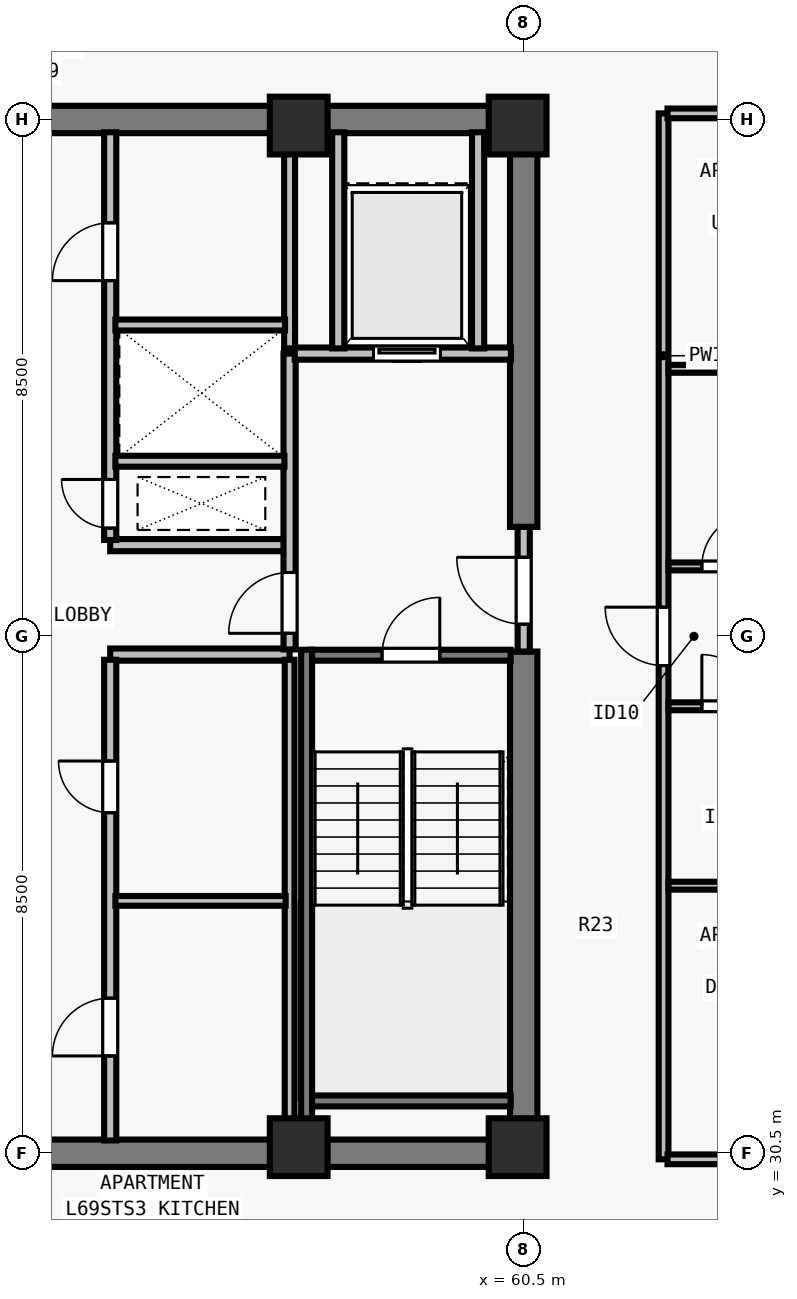
"""IFC4 building model, lengths in metres.
Left out: names, types, materials, properties, quantities, classifications, styles, units other than length and angle.
Written with IfcOpenShell. Run it as: python <this file> out.ifc"""

import sys

from ifc_helpers import new_model, si_unit, direction, frame, frame_2d, origin, origin_2d, place, context, subcontext, project, spatial, rectangle, extrude, element, fill, save


model = new_model("IFC4")
c1 = context("Model", 3, precision=1e-05, world=origin(), true_north=direction((0.0, 1.0)))
c2 = subcontext(c1, "Body", "Model", "MODEL_VIEW")
j1 = project(units=[si_unit("LENGTHUNIT", "METRE"), si_unit("PLANEANGLEUNIT", "RADIAN")], contexts=[c1])
p1 = place(None, origin())
s1 = spatial("IfcSite", under=j1, at=p1, CompositionType="ELEMENT")
p2 = place(p1, origin())
s2 = spatial("IfcBuilding", under=s1, at=p2, CompositionType="ELEMENT")
p3 = place(p2, frame((0.0, 0.0, 251.5)))
s3 = spatial("IfcBuildingStorey", under=s2, at=p3, CompositionType="ELEMENT", Elevation=251.5)
for number, where, z_axis, x_axis in (
    (1, (56.8, 30.6, 0.0), (0.0, 0.0, 1.0), (1.0, 0.0, 0.0)),
    (2, (60.4, 30.6, 0.0), (0.0, 0.0, 1.0), (1.0, 0.0, 0.0)),
    (3, (56.8, 47.4, 0.0), (0.0, 0.0, 1.0), (1.0, 0.0, 0.0)),
    (4, (60.4, 47.4, 0.0), (0.0, 0.0, 1.0), (1.0, 0.0, 0.0)),
):
    element("IfcColumn", number, at=place(p3, frame(where, z_axis=z_axis, x_axis=x_axis)), inside=s3, PredefinedType="COLUMN", context=c2, shape_type="SweptSolid", body=[
        extrude(rectangle(XDim=0.95, YDim=0.95, at=origin_2d()), origin(), (0.0, 0.0, 1.0), 3.5),
    ])
for number, where, z_axis, x_axis in (
    (5, (43.275, 30.5, 0.0), (0.0, 0.0, 1.0), (1.0, 0.0, 0.0)),
    (6, (43.275, 47.5, 0.0), (0.0, 0.0, 1.0), (1.0, 0.0, 0.0)),
):
    element("IfcWall", number, at=place(p3, frame(where, z_axis=z_axis, x_axis=x_axis)), inside=s3, PredefinedType="SHEAR", context=c2, shape_type="SweptSolid", body=[
        extrude(rectangle(XDim=17.45, YDim=0.45, at=frame_2d((8.725, 0.0))), origin(), (0.0, 0.0, 1.0), 3.29),
    ])
p4 = place(p3, frame((60.5, 30.715, 0.0), z_axis=(0.0, 0.0, 1.0), x_axis=(0.0, 1.0, 0.0)))
e7 = element("IfcWall", 7, at=p4, inside=s3, PredefinedType="SHEAR", context=c2, shape_type="SweptSolid", body=[
    extrude(rectangle(XDim=8.035, YDim=0.45, at=frame_2d((4.018, 0.0))), origin(), (0.0, 0.0, 1.0), 3.29),
])
p5 = place(p3, frame((60.5, 40.8, 0.0), z_axis=(0.0, 0.0, 1.0), x_axis=(0.0, 1.0, 0.0)))
e8 = element("IfcWall", 8, at=p5, inside=s3, PredefinedType="SHEAR", context=c2, shape_type="SweptSolid", body=[
    extrude(rectangle(XDim=6.485, YDim=0.45, at=frame_2d((3.242, 0.0))), origin(), (0.0, 0.0, 1.0), 3.29),
])
for number, where, z_axis, x_axis in (
    (9, (53.7, 38.7, 0.0), (0.0, 0.0, 1.0), (1.0, 0.0, 0.0)),
    (10, (53.7, 40.5, 0.0), (0.0, 0.0, 1.0), (1.0, 0.0, 0.0)),
):
    element("IfcWall", number, at=place(p3, frame(where, z_axis=z_axis, x_axis=x_axis)), inside=s3, PredefinedType="SOLIDWALL", context=c2, shape_type="SweptSolid", body=[
        extrude(rectangle(XDim=2.95, YDim=0.2, at=frame_2d((1.475, 0.0))), origin(), (0.0, 0.0, 1.0), 3.29),
    ])
p6 = place(p3, frame((53.7, 30.71, 0.0), z_axis=(0.0, 0.0, 1.0), x_axis=(0.0, 1.0, 0.0)))
e11 = element("IfcWall", 11, at=p6, inside=s3, PredefinedType="SOLIDWALL", context=c2, shape_type="SweptSolid", body=[
    extrude(rectangle(XDim=7.905, YDim=0.2, at=frame_2d((3.953, 0.0))), origin(), (0.0, 0.0, 1.0), 3.29),
])
p7 = place(p6, frame((1.39, 0.0, 0.0)))
e12 = element("IfcOpeningElement", 12, at=p7, cuts=e11, PredefinedType="OPENING", context=c2, shape_type="SweptSolid", body=[
    extrude(rectangle(XDim=0.95, YDim=2.12, at=frame_2d((0.475, 1.06))), frame((0.0, 0.11, 0.0), z_axis=(0.0, -1.0, 0.0), x_axis=(1.0, 0.0, 0.0)), (0.0, 0.0, 1.0), 0.22),
])
p8 = place(p6, frame((5.39, 0.0, 0.0)))
e13 = element("IfcOpeningElement", 13, at=p8, cuts=e11, PredefinedType="OPENING", context=c2, shape_type="SweptSolid", body=[
    extrude(rectangle(XDim=0.85, YDim=2.12, at=frame_2d((0.425, 1.06))), frame((0.0, 0.11, 0.0), z_axis=(0.0, -1.0, 0.0), x_axis=(1.0, 0.0, 0.0)), (0.0, 0.0, 1.0), 0.22),
])
p9 = place(p3, frame((53.7, 40.585, 0.0), z_axis=(0.0, 0.0, 1.0), x_axis=(0.0, 1.0, 0.0)))
e14 = element("IfcWall", 14, at=p9, inside=s3, PredefinedType="SOLIDWALL", context=c2, shape_type="SweptSolid", body=[
    extrude(rectangle(XDim=6.705, YDim=0.2, at=frame_2d((3.353, 0.0))), origin(), (0.0, 0.0, 1.0), 3.29),
])
p10 = place(p9, frame((0.195, 0.0, 0.0)))
e15 = element("IfcOpeningElement", 15, at=p10, cuts=e14, PredefinedType="OPENING", context=c2, shape_type="SweptSolid", body=[
    extrude(rectangle(XDim=0.8, YDim=2.08, at=frame_2d((0.4, 1.04))), frame((0.0, 0.11, 0.0), z_axis=(0.0, -1.0, 0.0), x_axis=(1.0, 0.0, 0.0)), (0.0, 0.0, 1.0), 0.22),
])
p11 = place(p9, frame((4.265, 0.0, 0.0)))
e16 = element("IfcOpeningElement", 16, at=p11, cuts=e14, PredefinedType="OPENING", context=c2, shape_type="SweptSolid", body=[
    extrude(rectangle(XDim=0.95, YDim=2.12, at=frame_2d((0.475, 1.06))), frame((0.0, 0.11, 0.0), z_axis=(0.0, -1.0, 0.0), x_axis=(1.0, 0.0, 0.0)), (0.0, 0.0, 1.0), 0.22),
])
p12 = place(p3, frame((60.5, 38.75, 0.0), z_axis=(0.0, 0.0, 1.0), x_axis=(0.0, 1.0, 0.0)))
e17 = element("IfcWall", 17, at=p12, inside=s3, PredefinedType="SOLIDWALL", context=c2, shape_type="SweptSolid", body=[
    extrude(rectangle(XDim=2.05, YDim=0.2, at=frame_2d((1.025, 0.0))), origin(), (0.0, 0.0, 1.0), 3.29),
])
p13 = place(p12, frame((0.45, 0.0, 0.0)))
e18 = element("IfcOpeningElement", 18, at=p13, cuts=e17, PredefinedType="OPENING", context=c2, shape_type="SweptSolid", body=[
    extrude(rectangle(XDim=1.1, YDim=2.15, at=frame_2d((0.55, 1.075))), frame((0.0, 0.11, 0.0), z_axis=(0.0, -1.0, 0.0), x_axis=(1.0, 0.0, 0.0)), (0.0, 0.0, 1.0), 0.22),
])
p14 = place(p3, frame((56.65, 38.785, 0.0), z_axis=(0.0, 0.0, 1.0), x_axis=(0.0, 1.0, 0.0)))
e19 = element("IfcWall", 19, at=p14, inside=s3, PredefinedType="SOLIDWALL", context=c2, shape_type="SweptSolid", body=[
    extrude(rectangle(XDim=4.865, YDim=0.2, at=frame_2d((2.433, 0.0))), origin(), (0.0, 0.0, 1.0), 3.29),
])
p15 = place(p14, frame((0.265, 0.0, 0.0)))
e20 = element("IfcOpeningElement", 20, at=p15, cuts=e19, PredefinedType="OPENING", context=c2, shape_type="SweptSolid", body=[
    extrude(rectangle(XDim=1.0, YDim=2.15, at=frame_2d((0.5, 1.075))), frame((0.0, 0.11, 0.0), z_axis=(0.0, -1.0, 0.0), x_axis=(1.0, 0.0, 0.0)), (0.0, 0.0, 1.0), 0.22),
])
p16 = place(p3, frame((56.735, 43.65, 0.0), z_axis=(0.0, 0.0, 1.0), x_axis=(1.0, 0.0, 0.0)))
e21 = element("IfcWall", 21, at=p16, inside=s3, PredefinedType="SOLIDWALL", context=c2, shape_type="SweptSolid", body=[
    extrude(rectangle(XDim=3.555, YDim=0.2, at=frame_2d((1.777, 0.0))), origin(), (0.0, 0.0, 1.0), 3.29),
])
p17 = place(p16, frame((1.295, 0.0, 0.0)))
e22 = element("IfcOpeningElement", 22, at=p17, cuts=e21, PredefinedType="OPENING", context=c2, shape_type="SweptSolid", body=[
    extrude(rectangle(XDim=1.1, YDim=2.2, at=frame_2d((0.55, 1.1))), frame((0.0, 0.11, 0.0), z_axis=(0.0, -1.0, 0.0), x_axis=(1.0, 0.0, 0.0)), (0.0, 0.0, 1.0), 0.22),
])
for number, where, z_axis, x_axis in (
    (23, (57.45, 43.735, 0.0), (0.0, 0.0, 1.0), (0.0, 1.0, 0.0)),
    (24, (59.75, 43.735, 0.0), (0.0, 0.0, 1.0), (0.0, 1.0, 0.0)),
):
    element("IfcWall", number, at=place(p3, frame(where, z_axis=z_axis, x_axis=x_axis)), inside=s3, PredefinedType="SOLIDWALL", context=c2, shape_type="SweptSolid", body=[
        extrude(rectangle(XDim=3.555, YDim=0.2, at=frame_2d((1.777, 0.0))), origin(), (0.0, 0.0, 1.0), 3.29),
    ])
p18 = place(p3, frame((56.65, 30.71, 0.0), z_axis=(0.0, 0.0, 1.0), x_axis=(0.0, 1.0, 0.0)))
e25 = element("IfcWall", 25, at=p18, inside=s3, PredefinedType="PARTITIONING", context=c2, shape_type="SweptSolid", body=[
    extrude(rectangle(XDim=7.905, YDim=0.16, at=frame_2d((3.953, 0.0))), origin(), (0.0, 0.0, 1.0), 3.29),
])
p19 = place(p3, frame((53.785, 34.65, 0.0), z_axis=(0.0, 0.0, 1.0), x_axis=(1.0, 0.0, 0.0)))
e26 = element("IfcWall", 26, at=p19, inside=s3, PredefinedType="PARTITIONING", context=c2, shape_type="SweptSolid", body=[
    extrude(rectangle(XDim=2.8, YDim=0.16, at=frame_2d((1.4, 0.0))), origin(), (0.0, 0.0, 1.0), 3.29),
])
p20 = place(p3, frame((56.65, 43.735, 0.0), z_axis=(0.0, 0.0, 1.0), x_axis=(0.0, 1.0, 0.0)))
e27 = element("IfcWall", 27, at=p20, inside=s3, PredefinedType="SOLIDWALL", context=c2, shape_type="SweptSolid", body=[
    extrude(rectangle(XDim=3.555, YDim=0.18, at=frame_2d((1.777, 0.0))), origin(), (0.0, 0.0, 1.0), 3.29),
])
p21 = place(p3, frame((53.785, 41.88, 0.0), z_axis=(0.0, 0.0, 1.0), x_axis=(1.0, 0.0, 0.0)))
e28 = element("IfcWall", 28, at=p21, inside=s3, PredefinedType="SOLIDWALL", context=c2, shape_type="SweptSolid", body=[
    extrude(rectangle(XDim=2.78, YDim=0.18, at=frame_2d((1.39, 0.0))), origin(), (0.0, 0.0, 1.0), 3.29),
])
p22 = place(p3, frame((53.785, 44.12, 0.0), z_axis=(0.0, 0.0, 1.0), x_axis=(1.0, 0.0, 0.0)))
e29 = element("IfcWall", 29, at=p22, inside=s3, PredefinedType="SOLIDWALL", context=c2, shape_type="SweptSolid", body=[
    extrude(rectangle(XDim=2.79, YDim=0.18, at=frame_2d((1.395, 0.0))), origin(), (0.0, 0.0, 1.0), 3.29),
])
p23 = place(p3, frame((62.8, 30.4, 0.0), z_axis=(0.0, 0.0, 1.0), x_axis=(0.0, 1.0, 0.0)))
e30 = element("IfcWall", 30, at=p23, inside=s3, PredefinedType="PARTITIONING", context=c2, shape_type="SweptSolid", body=[
    extrude(rectangle(XDim=17.2, YDim=0.16, at=frame_2d((8.6, 0.0))), origin(), (0.0, 0.0, 1.0), 3.29),
])
p24 = place(p23, frame((8.12, 0.0, 0.0)))
e31 = element("IfcOpeningElement", 31, at=p24, cuts=e30, PredefinedType="OPENING", context=c2, shape_type="SweptSolid", body=[
    extrude(rectangle(XDim=0.96, YDim=2.18, at=frame_2d((0.48, 1.09))), frame((0.0, 0.09, 0.0), z_axis=(0.0, -1.0, 0.0), x_axis=(1.0, 0.0, 0.0)), (0.0, 0.0, 1.0), 0.18),
])
for number, where, z_axis, x_axis in (
    (32, (62.865, 30.4, 0.0), (0.0, 0.0, 1.0), (1.0, 0.0, 0.0)),
    (33, (62.865, 47.6, 0.0), (0.0, 0.0, 1.0), (1.0, 0.0, 0.0)),
):
    element("IfcWall", number, at=place(p3, frame(where, z_axis=z_axis, x_axis=x_axis)), inside=s3, PredefinedType="PARTITIONING", context=c2, shape_type="SweptSolid", body=[
        extrude(rectangle(XDim=11.33, YDim=0.16, at=frame_2d((5.665, 0.0))), origin(), (0.0, 0.0, 1.0), 3.29),
    ])
p25 = place(p3, frame((62.88, 34.9, 0.0), z_axis=(0.0, 0.0, 1.0), x_axis=(1.0, 0.0, 0.0)))
e34 = element("IfcWall", 34, at=p25, inside=s3, PredefinedType="PLUMBINGWALL", context=c2, shape_type="SweptSolid", body=[
    extrude(rectangle(XDim=2.75, YDim=0.13, at=frame_2d((1.375, 0.0))), origin(), (0.0, 0.0, 1.0), 3.29),
])
p26 = place(p3, frame((62.88, 37.85, 0.0), z_axis=(0.0, 0.0, 1.0), x_axis=(1.0, 0.0, 0.0)))
e35 = element("IfcWall", 35, at=p26, inside=s3, PredefinedType="PLUMBINGWALL", context=c2, shape_type="SweptSolid", body=[
    extrude(rectangle(XDim=2.75, YDim=0.13, at=frame_2d((1.375, 0.0))), origin(), (0.0, 0.0, 1.0), 3.29),
])
p27 = place(p26, frame((0.55, 0.0, 0.0)))
e36 = element("IfcOpeningElement", 36, at=p27, cuts=e35, PredefinedType="OPENING", context=c2, shape_type="SweptSolid", body=[
    extrude(rectangle(XDim=0.85, YDim=2.08, at=frame_2d((0.425, 1.04))), frame((0.0, 0.075, 0.0), z_axis=(0.0, -1.0, 0.0), x_axis=(1.0, 0.0, 0.0)), (0.0, 0.0, 1.0), 0.15),
])
p28 = place(p3, frame((62.88, 43.4, 0.0), z_axis=(0.0, 0.0, 1.0), x_axis=(1.0, 0.0, 0.0)))
e37 = element("IfcWall", 37, at=p28, inside=s3, PredefinedType="PLUMBINGWALL", context=c2, shape_type="SweptSolid", body=[
    extrude(rectangle(XDim=2.75, YDim=0.13, at=frame_2d((1.375, 0.0))), origin(), (0.0, 0.0, 1.0), 3.29),
])
p29 = place(p3, frame((62.88, 40.15, 0.0), z_axis=(0.0, 0.0, 1.0), x_axis=(1.0, 0.0, 0.0)))
e38 = element("IfcWall", 38, at=p29, inside=s3, PredefinedType="PLUMBINGWALL", context=c2, shape_type="SweptSolid", body=[
    extrude(rectangle(XDim=2.75, YDim=0.13, at=frame_2d((1.375, 0.0))), origin(), (0.0, 0.0, 1.0), 3.29),
])
p30 = place(p29, frame((0.55, 0.0, 0.0)))
e39 = element("IfcOpeningElement", 39, at=p30, cuts=e38, PredefinedType="OPENING", context=c2, shape_type="SweptSolid", body=[
    extrude(rectangle(XDim=0.88, YDim=2.1, at=frame_2d((0.44, 1.05))), frame((0.0, 0.075, 0.0), z_axis=(0.0, -1.0, 0.0), x_axis=(1.0, 0.0, 0.0)), (0.0, 0.0, 1.0), 0.15),
])
p31 = place(p3, frame((57.005, 38.69, 0.0), z_axis=(0.0, 0.0, 1.0), x_axis=(1.0, 0.0, 0.0)))
e40 = element("IfcWall", 40, at=p31, inside=s3, PredefinedType="SOLIDWALL", context=c2, shape_type="SweptSolid", body=[
    extrude(rectangle(XDim=3.28, YDim=0.18, at=frame_2d((1.64, 0.0))), origin(), (0.0, 0.0, 1.0), 3.29),
])
p32 = place(p31, frame((1.165, 0.0, 0.0)))
e41 = element("IfcOpeningElement", 41, at=p32, cuts=e40, PredefinedType="OPENING", context=c2, shape_type="SweptSolid", body=[
    extrude(rectangle(XDim=0.95, YDim=2.15, at=frame_2d((0.475, 1.075))), frame((0.0, 0.1, 0.0), z_axis=(0.0, -1.0, 0.0), x_axis=(1.0, 0.0, 0.0)), (0.0, 0.0, 1.0), 0.2),
])
p33 = place(p3, frame((57.005, 31.36, 0.0), z_axis=(0.0, 0.0, 1.0), x_axis=(1.0, 0.0, 0.0)))
e42 = element("IfcWall", 42, at=p33, inside=s3, PredefinedType="SOLIDWALL", context=c2, shape_type="SweptSolid", body=[
    extrude(rectangle(XDim=3.28, YDim=0.18, at=frame_2d((1.64, 0.0))), origin(), (0.0, 0.0, 1.0), 3.29),
])
p34 = place(p3, frame((56.93, 38.78, 0.0), z_axis=(0.0, 0.0, 1.0), x_axis=(0.0, -1.0, 0.0)))
e43 = element("IfcWall", 43, at=p34, inside=s3, PredefinedType="SOLIDWALL", context=c2, shape_type="SweptSolid", body=[
    extrude(rectangle(XDim=8.067, YDim=0.18, at=frame_2d((4.034, 0.0))), origin(), (0.0, 0.0, 1.0), 3.29),
])
p35 = place(p13, origin())
e44 = element("IfcDoor", 44, at=p35, inside=s3, OperationType="SINGLE_SWING_RIGHT", PredefinedType="DOOR", context=c2, shape_type="SweptSolid", body=[
    extrude(rectangle(XDim=1.1, YDim=2.15, at=frame_2d((0.55, 1.075))), frame((0.0, 0.025, 0.0), z_axis=(0.0, -1.0, 0.0), x_axis=(1.0, 0.0, 0.0)), (0.0, 0.0, 1.0), 0.05),
])
fill(e18, e44)
p36 = place(p15, origin())
e45 = element("IfcDoor", 45, at=p36, inside=s3, OperationType="SINGLE_SWING_LEFT", PredefinedType="DOOR", context=c2, shape_type="SweptSolid", body=[
    extrude(rectangle(XDim=1.0, YDim=2.15, at=frame_2d((0.5, 1.075))), frame((0.0, 0.025, 0.0), z_axis=(0.0, -1.0, 0.0), x_axis=(1.0, 0.0, 0.0)), (0.0, 0.0, 1.0), 0.05),
])
fill(e20, e45)
p37 = place(p17, origin())
e46 = element("IfcDoor", 46, at=p37, inside=s3, OperationType="SLIDING_TO_LEFT", PredefinedType="DOOR", context=c2, shape_type="SweptSolid", body=[
    extrude(rectangle(XDim=1.1, YDim=2.2, at=frame_2d((0.55, 1.1))), frame((0.0, 0.025, 0.0), z_axis=(0.0, -1.0, 0.0), x_axis=(1.0, 0.0, 0.0)), (0.0, 0.0, 1.0), 0.05),
])
fill(e22, e46)
p38 = place(p7, origin())
e47 = element("IfcDoor", 47, at=p38, inside=s3, OperationType="SINGLE_SWING_LEFT", PredefinedType="DOOR", context=c2, shape_type="SweptSolid", body=[
    extrude(rectangle(XDim=0.95, YDim=2.12, at=frame_2d((0.475, 1.06))), frame((0.0, 0.025, 0.0), z_axis=(0.0, -1.0, 0.0), x_axis=(1.0, 0.0, 0.0)), (0.0, 0.0, 1.0), 0.05),
])
fill(e12, e47)
p39 = place(p8, origin())
e48 = element("IfcDoor", 48, at=p39, inside=s3, OperationType="SINGLE_SWING_RIGHT", PredefinedType="DOOR", context=c2, shape_type="SweptSolid", body=[
    extrude(rectangle(XDim=0.85, YDim=2.12, at=frame_2d((0.425, 1.06))), frame((0.0, 0.025, 0.0), z_axis=(0.0, -1.0, 0.0), x_axis=(1.0, 0.0, 0.0)), (0.0, 0.0, 1.0), 0.05),
])
fill(e13, e48)
p40 = place(p10, origin())
e49 = element("IfcDoor", 49, at=p40, inside=s3, OperationType="SINGLE_SWING_RIGHT", PredefinedType="DOOR", context=c2, shape_type="SweptSolid", body=[
    extrude(rectangle(XDim=0.8, YDim=2.08, at=frame_2d((0.4, 1.04))), frame((0.0, 0.025, 0.0), z_axis=(0.0, -1.0, 0.0), x_axis=(1.0, 0.0, 0.0)), (0.0, 0.0, 1.0), 0.05),
])
fill(e15, e49)
p41 = place(p11, origin())
e50 = element("IfcDoor", 50, at=p41, inside=s3, OperationType="SINGLE_SWING_LEFT", PredefinedType="DOOR", context=c2, shape_type="SweptSolid", body=[
    extrude(rectangle(XDim=0.95, YDim=2.12, at=frame_2d((0.475, 1.06))), frame((0.0, 0.025, 0.0), z_axis=(0.0, -1.0, 0.0), x_axis=(1.0, 0.0, 0.0)), (0.0, 0.0, 1.0), 0.05),
])
fill(e16, e50)
p42 = place(p27, origin())
e51 = element("IfcDoor", 51, at=p42, inside=s3, OperationType="SINGLE_SWING_LEFT", PredefinedType="DOOR", context=c2, shape_type="SweptSolid", body=[
    extrude(rectangle(XDim=0.85, YDim=2.08, at=frame_2d((0.425, 1.04))), frame((0.0, 0.025, 0.0), z_axis=(0.0, -1.0, 0.0), x_axis=(1.0, 0.0, 0.0)), (0.0, 0.0, 1.0), 0.05),
])
fill(e36, e51)
p43 = place(p30, origin())
e52 = element("IfcDoor", 52, at=p43, inside=s3, OperationType="SINGLE_SWING_RIGHT", PredefinedType="DOOR", context=c2, shape_type="SweptSolid", body=[
    extrude(rectangle(XDim=0.88, YDim=2.1, at=frame_2d((0.44, 1.05))), frame((0.0, 0.025, 0.0), z_axis=(0.0, -1.0, 0.0), x_axis=(1.0, 0.0, 0.0)), (0.0, 0.0, 1.0), 0.05),
])
fill(e39, e52)
p44 = place(p24, origin())
e53 = element("IfcDoor", 53, at=p44, inside=s3, OperationType="SINGLE_SWING_RIGHT", PredefinedType="DOOR", context=c2, shape_type="SweptSolid", body=[
    extrude(rectangle(XDim=0.96, YDim=2.18, at=frame_2d((0.48, 1.09))), frame((0.0, 0.025, 0.0), z_axis=(0.0, -1.0, 0.0), x_axis=(1.0, 0.0, 0.0)), (0.0, 0.0, 1.0), 0.05),
])
fill(e31, e53)
p45 = place(p32, origin())
e54 = element("IfcDoor", 54, at=p45, inside=s3, OperationType="SINGLE_SWING_RIGHT", PredefinedType="DOOR", context=c2, shape_type="SweptSolid", body=[
    extrude(rectangle(XDim=0.95, YDim=2.15, at=frame_2d((0.475, 1.075))), frame((0.0, 0.025, 0.0), z_axis=(0.0, -1.0, 0.0), x_axis=(1.0, 0.0, 0.0)), (0.0, 0.0, 1.0), 0.05),
])
fill(e41, e54)
save(model, sys.argv[1])
